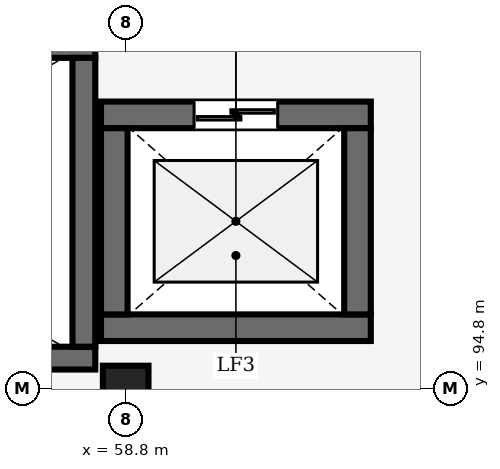
"""IFC4 building model, lengths in metres.
Left out: names, types, materials, properties, quantities, classifications, styles, units other than length and angle.
Written with IfcOpenShell. Run it as: python <this file> out.ifc"""

import sys

from ifc_helpers import new_model, si_unit, direction, frame, frame_2d, origin, origin_2d, place, context, subcontext, project, spatial, rectangle, extrude, element, fill, save


model = new_model("IFC4")
c1 = context("Model", 3, precision=1e-05, world=origin(), true_north=direction((0.0, 1.0)))
c2 = subcontext(c1, "Body", "Model", "MODEL_VIEW")
j1 = project(units=[si_unit("LENGTHUNIT", "METRE"), si_unit("PLANEANGLEUNIT", "RADIAN")], contexts=[c1])
p1 = place(None, origin())
s1 = spatial("IfcSite", under=j1, at=p1, CompositionType="ELEMENT")
p2 = place(p1, origin())
s2 = spatial("IfcBuilding", under=s1, at=p2, CompositionType="ELEMENT")
p3 = place(p2, frame((0.0, 0.0, 4.8)))
s3 = spatial("IfcBuildingStorey", under=s2, at=p3, CompositionType="ELEMENT", Elevation=4.8)
p4 = place(p3, frame((58.8, 94.8, 0.0), z_axis=(0.0, 0.0, 1.0), x_axis=(1.0, 0.0, 0.0)))
e1 = element("IfcColumn", 1, at=p4, inside=s3, PredefinedType="COLUMN", context=c2, shape_type="SweptSolid", body=[
    extrude(rectangle(XDim=0.6, YDim=0.6, at=origin_2d()), origin(), (0.0, 0.0, 1.0), 4.2),
])
for number, where, z_axis, x_axis in (
    (2, (50.8, 95.2, 0.0), (0.0, 0.0, 1.0), (1.0, 0.0, 0.0)),
    (3, (50.8, 99.3, 0.0), (0.0, 0.0, 1.0), (1.0, 0.0, 0.0)),
):
    element("IfcWall", number, at=place(p3, frame(where, z_axis=z_axis, x_axis=x_axis)), inside=s3, PredefinedType="SHEAR", context=c2, shape_type="SweptSolid", body=[
        extrude(rectangle(XDim=7.6, YDim=0.3, at=frame_2d((3.8, 0.0))), origin(), (0.0, 0.0, 1.0), 4.025),
    ])
p5 = place(p3, frame((58.25, 95.35, 0.0), z_axis=(0.0, 0.0, 1.0), x_axis=(0.0, 1.0, 0.0)))
e4 = element("IfcWall", 4, at=p5, inside=s3, PredefinedType="SHEAR", context=c2, shape_type="SweptSolid", body=[
    extrude(rectangle(XDim=3.8, YDim=0.3, at=frame_2d((1.9, 0.0))), origin(), (0.0, 0.0, 1.0), 4.025),
])
p6 = place(p3, frame((58.475, 95.6, 0.0), z_axis=(0.0, 0.0, 1.0), x_axis=(1.0, 0.0, 0.0)))
e5 = element("IfcWall", 5, at=p6, inside=s3, PredefinedType="SHEAR", context=c2, shape_type="SweptSolid", body=[
    extrude(rectangle(XDim=3.55, YDim=0.35, at=frame_2d((1.775, 0.0))), origin(), (0.0, 0.0, 1.0), 3.92),
])
p7 = place(p3, frame((58.475, 98.4, 0.0), z_axis=(0.0, 0.0, 1.0), x_axis=(1.0, 0.0, 0.0)))
e6 = element("IfcWall", 6, at=p7, inside=s3, PredefinedType="SHEAR", context=c2, shape_type="SweptSolid", body=[
    extrude(rectangle(XDim=3.55, YDim=0.35, at=frame_2d((1.775, 0.0))), origin(), (0.0, 0.0, 1.0), 3.92),
])
p8 = place(p7, frame((1.225, 0.0, 0.0)))
e7 = element("IfcOpeningElement", 7, at=p8, cuts=e6, PredefinedType="OPENING", context=c2, shape_type="SweptSolid", body=[
    extrude(rectangle(XDim=1.1, YDim=2.2, at=frame_2d((0.55, 1.1))), frame((0.0, 0.185, 0.0), z_axis=(0.0, -1.0, 0.0), x_axis=(1.0, 0.0, 0.0)), (0.0, 0.0, 1.0), 0.37),
])
for number, where, z_axis, x_axis in (
    (8, (58.65, 95.775, 0.0), (0.0, 0.0, 1.0), (0.0, 1.0, 0.0)),
    (9, (61.85, 95.775, 0.0), (0.0, 0.0, 1.0), (0.0, 1.0, 0.0)),
):
    element("IfcWall", number, at=place(p3, frame(where, z_axis=z_axis, x_axis=x_axis)), inside=s3, PredefinedType="SHEAR", context=c2, shape_type="SweptSolid", body=[
        extrude(rectangle(XDim=2.45, YDim=0.35, at=frame_2d((1.225, 0.0))), origin(), (0.0, 0.0, 1.0), 3.92),
    ])
p9 = place(p8, origin())
e10 = element("IfcDoor", 10, at=p9, inside=s3, OperationType="DOUBLE_DOOR_SLIDING", PredefinedType="DOOR", context=c2, shape_type="SweptSolid", body=[
    extrude(rectangle(XDim=1.1, YDim=2.2, at=frame_2d((0.55, 1.1))), frame((0.0, 0.025, 0.0), z_axis=(0.0, -1.0, 0.0), x_axis=(1.0, 0.0, 0.0)), (0.0, 0.0, 1.0), 0.05),
])
fill(e7, e10)
save(model, sys.argv[1])
